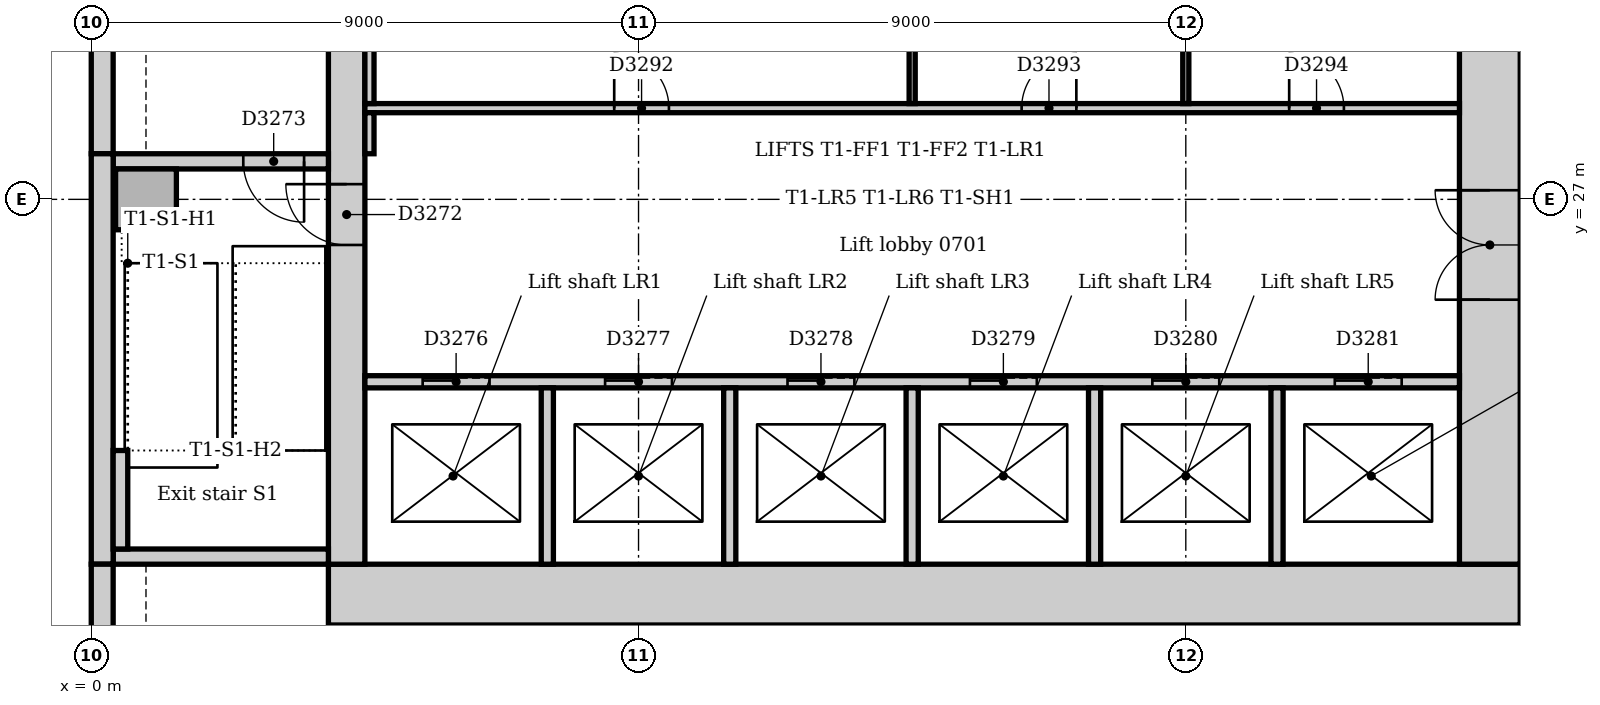
"""IFC4 building model, lengths in metres.
Left out: names, types, materials, properties, quantities, classifications, styles, units other than length and angle.
Written with IfcOpenShell. Run it as: python <this file> out.ifc"""

import sys

from ifc_helpers import new_model, si_unit, direction, frame, frame_2d, origin, origin_2d, place, context, subcontext, project, spatial, rectangle, extrude, element, fill, save


model = new_model("IFC4")
c1 = context("Model", 3, precision=1e-05, world=origin(), true_north=direction((0.0, 1.0)))
c2 = subcontext(c1, "Body", "Model", "MODEL_VIEW")
j1 = project(units=[si_unit("LENGTHUNIT", "METRE"), si_unit("PLANEANGLEUNIT", "RADIAN")], contexts=[c1])
p1 = place(None, origin())
s1 = spatial("IfcSite", under=j1, at=p1, CompositionType="ELEMENT")
p2 = place(p1, origin())
s2 = spatial("IfcBuilding", under=s1, at=p2, CompositionType="ELEMENT")
p3 = place(p2, frame((0.0, 0.0, 34.0)))
s3 = spatial("IfcBuildingStorey", under=s2, at=p3, CompositionType="ELEMENT", Elevation=34.0)
p4 = place(p3, frame((3.9, 20.5, 0.0), z_axis=(0.0, 0.0, 1.0), x_axis=(1.0, 0.0, 0.0)))
e1 = element("IfcWall", 1, at=p4, inside=s3, PredefinedType="SOLIDWALL", context=c2, shape_type="SweptSolid", body=[
    extrude(rectangle(XDim=19.6, YDim=1.0, at=frame_2d((9.8, 0.0))), origin(), (0.0, 0.0, 1.0), 4.0),
])
p5 = place(p3, frame((23.0, 21.0, 0.0), z_axis=(0.0, 0.0, 1.0), x_axis=(0.0, 1.0, 0.0)))
e2 = element("IfcWall", 2, at=p5, inside=s3, PredefinedType="SOLIDWALL", context=c2, shape_type="SweptSolid", body=[
    extrude(rectangle(XDim=10.5, YDim=1.0, at=frame_2d((5.25, 0.0))), origin(), (0.0, 0.0, 1.0), 4.0),
])
p6 = place(p5, frame((4.35, 0.0, 0.0)))
e3 = element("IfcOpeningElement", 3, at=p6, cuts=e2, PredefinedType="OPENING", context=c2, shape_type="SweptSolid", body=[
    extrude(rectangle(XDim=1.8, YDim=2.1, at=frame_2d((0.9, 1.05))), frame((0.0, 0.51, 0.0), z_axis=(0.0, -1.0, 0.0), x_axis=(1.0, 0.0, 0.0)), (0.0, 0.0, 1.0), 1.02),
])
p7 = place(p3, frame((4.2, 31.5, 0.0), z_axis=(0.0, 0.0, 1.0), x_axis=(0.0, -1.0, 0.0)))
e4 = element("IfcWall", 4, at=p7, inside=s3, PredefinedType="SOLIDWALL", context=c2, shape_type="SweptSolid", body=[
    extrude(rectangle(XDim=10.5, YDim=0.6, at=frame_2d((5.25, 0.0))), origin(), (0.0, 0.0, 1.0), 4.0),
])
p8 = place(p7, frame((4.25, 0.0, 0.0)))
e5 = element("IfcOpeningElement", 5, at=p8, cuts=e4, PredefinedType="OPENING", context=c2, shape_type="SweptSolid", body=[
    extrude(rectangle(XDim=1.0, YDim=2.1, at=frame_2d((0.5, 1.05))), frame((0.0, 0.31, 0.0), z_axis=(0.0, -1.0, 0.0), x_axis=(1.0, 0.0, 0.0)), (0.0, 0.0, 1.0), 0.62),
])
p9 = place(p3, frame((0.36, 21.125, 0.0), z_axis=(0.0, 0.0, 1.0), x_axis=(1.0, 0.0, 0.0)))
e6 = element("IfcWall", 6, at=p9, inside=s3, PredefinedType="SOLIDWALL", context=c2, shape_type="SweptSolid", body=[
    extrude(rectangle(XDim=3.54, YDim=0.25, at=frame_2d((1.77, 0.0))), origin(), (0.0, 0.0, 1.0), 4.0),
])
p10 = place(p3, frame((3.9, 27.625, 0.0), z_axis=(0.0, 0.0, 1.0), x_axis=(-1.0, 0.0, 0.0)))
e7 = element("IfcWall", 7, at=p10, inside=s3, PredefinedType="SOLIDWALL", context=c2, shape_type="SweptSolid", body=[
    extrude(rectangle(XDim=3.54, YDim=0.25, at=frame_2d((1.77, 0.0))), origin(), (0.0, 0.0, 1.0), 4.0),
])
p11 = place(p10, frame((0.4, 0.0, 0.0)))
e8 = element("IfcOpeningElement", 8, at=p11, cuts=e7, PredefinedType="OPENING", context=c2, shape_type="SweptSolid", body=[
    extrude(rectangle(XDim=1.0, YDim=2.1, at=frame_2d((0.5, 1.05))), frame((0.0, 0.135, 0.0), z_axis=(0.0, -1.0, 0.0), x_axis=(1.0, 0.0, 0.0)), (0.0, 0.0, 1.0), 0.27),
])
p12 = place(p3, frame((0.9, 27.0, 0.0), z_axis=(0.0, 0.0, 1.0), x_axis=(1.0, 0.0, 0.0)))
e9 = element("IfcColumn", 9, at=p12, inside=s3, PredefinedType="COLUMN", context=c2, shape_type="SweptSolid", body=[
    extrude(rectangle(XDim=1.0, YDim=1.0, at=origin_2d()), origin(), (0.0, 0.0, 1.0), 4.0),
])
p13 = place(p3, frame((0.18, 35.25, 0.0), z_axis=(0.0, 0.0, 1.0), x_axis=(0.0, -1.0, 0.0)))
e10 = element("IfcWall", 10, at=p13, inside=s3, PredefinedType="STANDARD", context=c2, shape_type="SweptSolid", body=[
    extrude(rectangle(XDim=7.5, YDim=0.36, at=frame_2d((3.75, 0.0))), origin(), (0.0, 0.0, 1.0), 3.85),
])
p14 = place(p3, frame((0.18, 27.75, 0.0), z_axis=(0.0, 0.0, 1.0), x_axis=(0.0, -1.0, 0.0)))
e11 = element("IfcWall", 11, at=p14, inside=s3, PredefinedType="STANDARD", context=c2, shape_type="SweptSolid", body=[
    extrude(rectangle(XDim=6.75, YDim=0.36, at=frame_2d((3.375, 0.0))), origin(), (0.0, 0.0, 1.0), 3.85),
])
p15 = place(p3, frame((0.18, 21.0, 0.0), z_axis=(0.0, 0.0, 1.0), x_axis=(0.0, -1.0, 0.0)))
e12 = element("IfcWall", 12, at=p15, inside=s3, PredefinedType="STANDARD", context=c2, shape_type="SweptSolid", body=[
    extrude(rectangle(XDim=16.757, YDim=0.36, at=frame_2d((8.379, 0.0))), origin(), (0.0, 0.0, 1.0), 3.85),
])
p16 = place(p15, frame((1.35, 0.0, 0.9)))
e13 = element("IfcOpeningElement", 13, at=p16, cuts=e12, PredefinedType="OPENING", context=c2, shape_type="SweptSolid", body=[
    extrude(rectangle(XDim=3.3, YDim=1.6, at=frame_2d((1.65, 0.8))), frame((0.0, 0.19, 0.0), z_axis=(0.0, -1.0, 0.0), x_axis=(1.0, 0.0, 0.0)), (0.0, 0.0, 1.0), 0.38),
])
p17 = place(p15, frame((5.85, 0.0, 0.9)))
e14 = element("IfcOpeningElement", 14, at=p17, cuts=e12, PredefinedType="OPENING", context=c2, shape_type="SweptSolid", body=[
    extrude(rectangle(XDim=3.3, YDim=1.6, at=frame_2d((1.65, 0.8))), frame((0.0, 0.19, 0.0), z_axis=(0.0, -1.0, 0.0), x_axis=(1.0, 0.0, 0.0)), (0.0, 0.0, 1.0), 0.38),
])
p18 = place(p15, frame((10.35, 0.0, 0.9)))
e15 = element("IfcOpeningElement", 15, at=p18, cuts=e12, PredefinedType="OPENING", context=c2, shape_type="SweptSolid", body=[
    extrude(rectangle(XDim=3.3, YDim=1.6, at=frame_2d((1.65, 0.8))), frame((0.0, 0.19, 0.0), z_axis=(0.0, -1.0, 0.0), x_axis=(1.0, 0.0, 0.0)), (0.0, 0.0, 1.0), 0.38),
])
p19 = place(p3, frame((0.48, 21.25, 0.0), z_axis=(0.0, 0.0, 1.0), x_axis=(0.0, 1.0, 0.0)))
e16 = element("IfcWall", 16, at=p19, inside=s3, PredefinedType="STANDARD", context=c2, shape_type="SweptSolid", body=[
    extrude(rectangle(XDim=1.62, YDim=0.24, at=frame_2d((0.81, 0.0))), origin(), (0.0, 0.0, 1.0), 4.0),
])
p20 = place(p3, frame((4.5, 24.0, 0.0), z_axis=(0.0, 0.0, 1.0), x_axis=(1.0, 0.0, 0.0)))
e17 = element("IfcWall", 17, at=p20, inside=s3, PredefinedType="PARTITIONING", context=c2, shape_type="SweptSolid", body=[
    extrude(rectangle(XDim=18.0, YDim=0.2, at=frame_2d((9.0, 0.0))), origin(), (0.0, 0.0, 1.0), 3.85),
])
p21 = place(p20, frame((0.95, 0.0, 0.0)))
e18 = element("IfcOpeningElement", 18, at=p21, cuts=e17, PredefinedType="OPENING", context=c2, shape_type="SweptSolid", body=[
    extrude(rectangle(XDim=1.1, YDim=2.1, at=frame_2d((0.55, 1.05))), frame((0.0, 0.11, 0.0), z_axis=(0.0, -1.0, 0.0), x_axis=(1.0, 0.0, 0.0)), (0.0, 0.0, 1.0), 0.22),
])
p22 = place(p20, frame((3.95, 0.0, 0.0)))
e19 = element("IfcOpeningElement", 19, at=p22, cuts=e17, PredefinedType="OPENING", context=c2, shape_type="SweptSolid", body=[
    extrude(rectangle(XDim=1.1, YDim=2.1, at=frame_2d((0.55, 1.05))), frame((0.0, 0.11, 0.0), z_axis=(0.0, -1.0, 0.0), x_axis=(1.0, 0.0, 0.0)), (0.0, 0.0, 1.0), 0.22),
])
p23 = place(p20, frame((6.95, 0.0, 0.0)))
e20 = element("IfcOpeningElement", 20, at=p23, cuts=e17, PredefinedType="OPENING", context=c2, shape_type="SweptSolid", body=[
    extrude(rectangle(XDim=1.1, YDim=2.1, at=frame_2d((0.55, 1.05))), frame((0.0, 0.11, 0.0), z_axis=(0.0, -1.0, 0.0), x_axis=(1.0, 0.0, 0.0)), (0.0, 0.0, 1.0), 0.22),
])
p24 = place(p20, frame((9.95, 0.0, 0.0)))
e21 = element("IfcOpeningElement", 21, at=p24, cuts=e17, PredefinedType="OPENING", context=c2, shape_type="SweptSolid", body=[
    extrude(rectangle(XDim=1.1, YDim=2.1, at=frame_2d((0.55, 1.05))), frame((0.0, 0.11, 0.0), z_axis=(0.0, -1.0, 0.0), x_axis=(1.0, 0.0, 0.0)), (0.0, 0.0, 1.0), 0.22),
])
p25 = place(p20, frame((12.95, 0.0, 0.0)))
e22 = element("IfcOpeningElement", 22, at=p25, cuts=e17, PredefinedType="OPENING", context=c2, shape_type="SweptSolid", body=[
    extrude(rectangle(XDim=1.1, YDim=2.1, at=frame_2d((0.55, 1.05))), frame((0.0, 0.11, 0.0), z_axis=(0.0, -1.0, 0.0), x_axis=(1.0, 0.0, 0.0)), (0.0, 0.0, 1.0), 0.22),
])
p26 = place(p20, frame((15.95, 0.0, 0.0)))
e23 = element("IfcOpeningElement", 23, at=p26, cuts=e17, PredefinedType="OPENING", context=c2, shape_type="SweptSolid", body=[
    extrude(rectangle(XDim=1.1, YDim=2.1, at=frame_2d((0.55, 1.05))), frame((0.0, 0.11, 0.0), z_axis=(0.0, -1.0, 0.0), x_axis=(1.0, 0.0, 0.0)), (0.0, 0.0, 1.0), 0.22),
])
for number, where, z_axis, x_axis in (
    (24, (7.5, 21.0, 0.0), (0.0, 0.0, 1.0), (0.0, 1.0, 0.0)),
    (25, (10.5, 21.0, 0.0), (0.0, 0.0, 1.0), (0.0, 1.0, 0.0)),
    (26, (13.5, 21.0, 0.0), (0.0, 0.0, 1.0), (0.0, 1.0, 0.0)),
    (27, (16.5, 21.0, 0.0), (0.0, 0.0, 1.0), (0.0, 1.0, 0.0)),
    (28, (19.5, 21.0, 0.0), (0.0, 0.0, 1.0), (0.0, 1.0, 0.0)),
):
    element("IfcWall", number, at=place(p3, frame(where, z_axis=z_axis, x_axis=x_axis)), inside=s3, PredefinedType="PARTITIONING", context=c2, shape_type="SweptSolid", body=[
        extrude(rectangle(XDim=2.9, YDim=0.2, at=frame_2d((1.45, 0.0))), origin(), (0.0, 0.0, 1.0), 3.85),
    ])
p27 = place(p3, frame((4.5, 28.5, 0.0), z_axis=(0.0, 0.0, 1.0), x_axis=(1.0, 0.0, 0.0)))
e29 = element("IfcWall", 29, at=p27, inside=s3, PredefinedType="PARTITIONING", context=c2, shape_type="SweptSolid", body=[
    extrude(rectangle(XDim=18.0, YDim=0.15, at=frame_2d((9.0, 0.0))), origin(), (0.0, 0.0, 1.0), 3.85),
])
p28 = place(p27, frame((4.1, 0.0, 0.0)))
e30 = element("IfcOpeningElement", 30, at=p28, cuts=e29, PredefinedType="OPENING", context=c2, shape_type="SweptSolid", body=[
    extrude(rectangle(XDim=0.9, YDim=2.1, at=frame_2d((0.45, 1.05))), frame((0.0, 0.085, 0.0), z_axis=(0.0, -1.0, 0.0), x_axis=(1.0, 0.0, 0.0)), (0.0, 0.0, 1.0), 0.17),
])
p29 = place(p27, frame((10.8, 0.0, 0.0)))
e31 = element("IfcOpeningElement", 31, at=p29, cuts=e29, PredefinedType="OPENING", context=c2, shape_type="SweptSolid", body=[
    extrude(rectangle(XDim=0.9, YDim=2.1, at=frame_2d((0.45, 1.05))), frame((0.0, 0.085, 0.0), z_axis=(0.0, -1.0, 0.0), x_axis=(1.0, 0.0, 0.0)), (0.0, 0.0, 1.0), 0.17),
])
p30 = place(p27, frame((15.2, 0.0, 0.0)))
e32 = element("IfcOpeningElement", 32, at=p30, cuts=e29, PredefinedType="OPENING", context=c2, shape_type="SweptSolid", body=[
    extrude(rectangle(XDim=0.9, YDim=2.1, at=frame_2d((0.45, 1.05))), frame((0.0, 0.085, 0.0), z_axis=(0.0, -1.0, 0.0), x_axis=(1.0, 0.0, 0.0)), (0.0, 0.0, 1.0), 0.17),
])
p31 = place(p3, frame((4.575, 27.75, 0.0), z_axis=(0.0, 0.0, 1.0), x_axis=(0.0, 1.0, 0.0)))
e33 = element("IfcWall", 33, at=p31, inside=s3, PredefinedType="PARTITIONING", context=c2, shape_type="SweptSolid", body=[
    extrude(rectangle(XDim=0.675, YDim=0.15, at=frame_2d((0.338, 0.0))), origin(), (0.0, 0.0, 1.0), 3.85),
])
p32 = place(p3, frame((4.575, 28.575, 0.0), z_axis=(0.0, 0.0, 1.0), x_axis=(0.0, 1.0, 0.0)))
e34 = element("IfcWall", 34, at=p32, inside=s3, PredefinedType="PARTITIONING", context=c2, shape_type="SweptSolid", body=[
    extrude(rectangle(XDim=2.675, YDim=0.15, at=frame_2d((1.337, 0.0))), origin(), (0.0, 0.0, 1.0), 3.85),
])
for number, where, z_axis, x_axis in (
    (35, (13.5, 28.575, 0.0), (0.0, 0.0, 1.0), (0.0, 1.0, 0.0)),
    (36, (18.0, 28.575, 0.0), (0.0, 0.0, 1.0), (0.0, 1.0, 0.0)),
):
    element("IfcWall", number, at=place(p3, frame(where, z_axis=z_axis, x_axis=x_axis)), inside=s3, PredefinedType="PARTITIONING", context=c2, shape_type="SweptSolid", body=[
        extrude(rectangle(XDim=2.675, YDim=0.1, at=frame_2d((1.337, 0.0))), origin(), (0.0, 0.0, 1.0), 3.85),
    ])
p33 = place(p8, frame((1.0, 0.0, 0.0), z_axis=(0.0, 0.0, 1.0), x_axis=(-1.0, 0.0, 0.0)))
e37 = element("IfcDoor", 37, at=p33, inside=s3, OperationType="SINGLE_SWING_RIGHT", PredefinedType="DOOR", context=c2, shape_type="SweptSolid", body=[
    extrude(rectangle(XDim=1.0, YDim=2.1, at=frame_2d((0.5, 1.05))), frame((0.0, 0.025, 0.0), z_axis=(0.0, -1.0, 0.0), x_axis=(1.0, 0.0, 0.0)), (0.0, 0.0, 1.0), 0.05),
])
fill(e5, e37)
p34 = place(p11, origin())
e38 = element("IfcDoor", 38, at=p34, inside=s3, OperationType="SINGLE_SWING_LEFT", PredefinedType="DOOR", context=c2, shape_type="SweptSolid", body=[
    extrude(rectangle(XDim=1.0, YDim=2.1, at=frame_2d((0.5, 1.05))), frame((0.0, 0.025, 0.0), z_axis=(0.0, -1.0, 0.0), x_axis=(1.0, 0.0, 0.0)), (0.0, 0.0, 1.0), 0.05),
])
fill(e8, e38)
p35 = place(p21, origin())
e39 = element("IfcDoor", 39, at=p35, inside=s3, OperationType="SLIDING_TO_LEFT", PredefinedType="DOOR", context=c2, shape_type="SweptSolid", body=[
    extrude(rectangle(XDim=1.1, YDim=2.1, at=frame_2d((0.55, 1.05))), frame((0.0, 0.025, 0.0), z_axis=(0.0, -1.0, 0.0), x_axis=(1.0, 0.0, 0.0)), (0.0, 0.0, 1.0), 0.05),
])
fill(e18, e39)
p36 = place(p22, origin())
e40 = element("IfcDoor", 40, at=p36, inside=s3, OperationType="SLIDING_TO_LEFT", PredefinedType="DOOR", context=c2, shape_type="SweptSolid", body=[
    extrude(rectangle(XDim=1.1, YDim=2.1, at=frame_2d((0.55, 1.05))), frame((0.0, 0.025, 0.0), z_axis=(0.0, -1.0, 0.0), x_axis=(1.0, 0.0, 0.0)), (0.0, 0.0, 1.0), 0.05),
])
fill(e19, e40)
p37 = place(p23, origin())
e41 = element("IfcDoor", 41, at=p37, inside=s3, OperationType="SLIDING_TO_LEFT", PredefinedType="DOOR", context=c2, shape_type="SweptSolid", body=[
    extrude(rectangle(XDim=1.1, YDim=2.1, at=frame_2d((0.55, 1.05))), frame((0.0, 0.025, 0.0), z_axis=(0.0, -1.0, 0.0), x_axis=(1.0, 0.0, 0.0)), (0.0, 0.0, 1.0), 0.05),
])
fill(e20, e41)
p38 = place(p24, origin())
e42 = element("IfcDoor", 42, at=p38, inside=s3, OperationType="SLIDING_TO_LEFT", PredefinedType="DOOR", context=c2, shape_type="SweptSolid", body=[
    extrude(rectangle(XDim=1.1, YDim=2.1, at=frame_2d((0.55, 1.05))), frame((0.0, 0.025, 0.0), z_axis=(0.0, -1.0, 0.0), x_axis=(1.0, 0.0, 0.0)), (0.0, 0.0, 1.0), 0.05),
])
fill(e21, e42)
p39 = place(p25, origin())
e43 = element("IfcDoor", 43, at=p39, inside=s3, OperationType="SLIDING_TO_LEFT", PredefinedType="DOOR", context=c2, shape_type="SweptSolid", body=[
    extrude(rectangle(XDim=1.1, YDim=2.1, at=frame_2d((0.55, 1.05))), frame((0.0, 0.025, 0.0), z_axis=(0.0, -1.0, 0.0), x_axis=(1.0, 0.0, 0.0)), (0.0, 0.0, 1.0), 0.05),
])
fill(e22, e43)
p40 = place(p26, origin())
e44 = element("IfcDoor", 44, at=p40, inside=s3, OperationType="SLIDING_TO_LEFT", PredefinedType="DOOR", context=c2, shape_type="SweptSolid", body=[
    extrude(rectangle(XDim=1.1, YDim=2.1, at=frame_2d((0.55, 1.05))), frame((0.0, 0.025, 0.0), z_axis=(0.0, -1.0, 0.0), x_axis=(1.0, 0.0, 0.0)), (0.0, 0.0, 1.0), 0.05),
])
fill(e23, e44)
p41 = place(p6, origin())
e45 = element("IfcDoor", 45, at=p41, inside=s3, OperationType="DOUBLE_DOOR_DOUBLE_SWING", PredefinedType="DOOR", context=c2, shape_type="SweptSolid", body=[
    extrude(rectangle(XDim=1.8, YDim=2.1, at=frame_2d((0.9, 1.05))), frame((0.0, 0.025, 0.0), z_axis=(0.0, -1.0, 0.0), x_axis=(1.0, 0.0, 0.0)), (0.0, 0.0, 1.0), 0.05),
])
fill(e3, e45)
p42 = place(p28, origin())
e46 = element("IfcDoor", 46, at=p42, inside=s3, OperationType="SINGLE_SWING_LEFT", PredefinedType="DOOR", context=c2, shape_type="SweptSolid", body=[
    extrude(rectangle(XDim=0.9, YDim=2.1, at=frame_2d((0.45, 1.05))), frame((0.0, 0.025, 0.0), z_axis=(0.0, -1.0, 0.0), x_axis=(1.0, 0.0, 0.0)), (0.0, 0.0, 1.0), 0.05),
])
fill(e30, e46)
p43 = place(p29, origin())
e47 = element("IfcDoor", 47, at=p43, inside=s3, OperationType="SINGLE_SWING_RIGHT", PredefinedType="DOOR", context=c2, shape_type="SweptSolid", body=[
    extrude(rectangle(XDim=0.9, YDim=2.1, at=frame_2d((0.45, 1.05))), frame((0.0, 0.025, 0.0), z_axis=(0.0, -1.0, 0.0), x_axis=(1.0, 0.0, 0.0)), (0.0, 0.0, 1.0), 0.05),
])
fill(e31, e47)
p44 = place(p30, origin())
e48 = element("IfcDoor", 48, at=p44, inside=s3, OperationType="SINGLE_SWING_LEFT", PredefinedType="DOOR", context=c2, shape_type="SweptSolid", body=[
    extrude(rectangle(XDim=0.9, YDim=2.1, at=frame_2d((0.45, 1.05))), frame((0.0, 0.025, 0.0), z_axis=(0.0, -1.0, 0.0), x_axis=(1.0, 0.0, 0.0)), (0.0, 0.0, 1.0), 0.05),
])
fill(e32, e48)
save(model, sys.argv[1])
